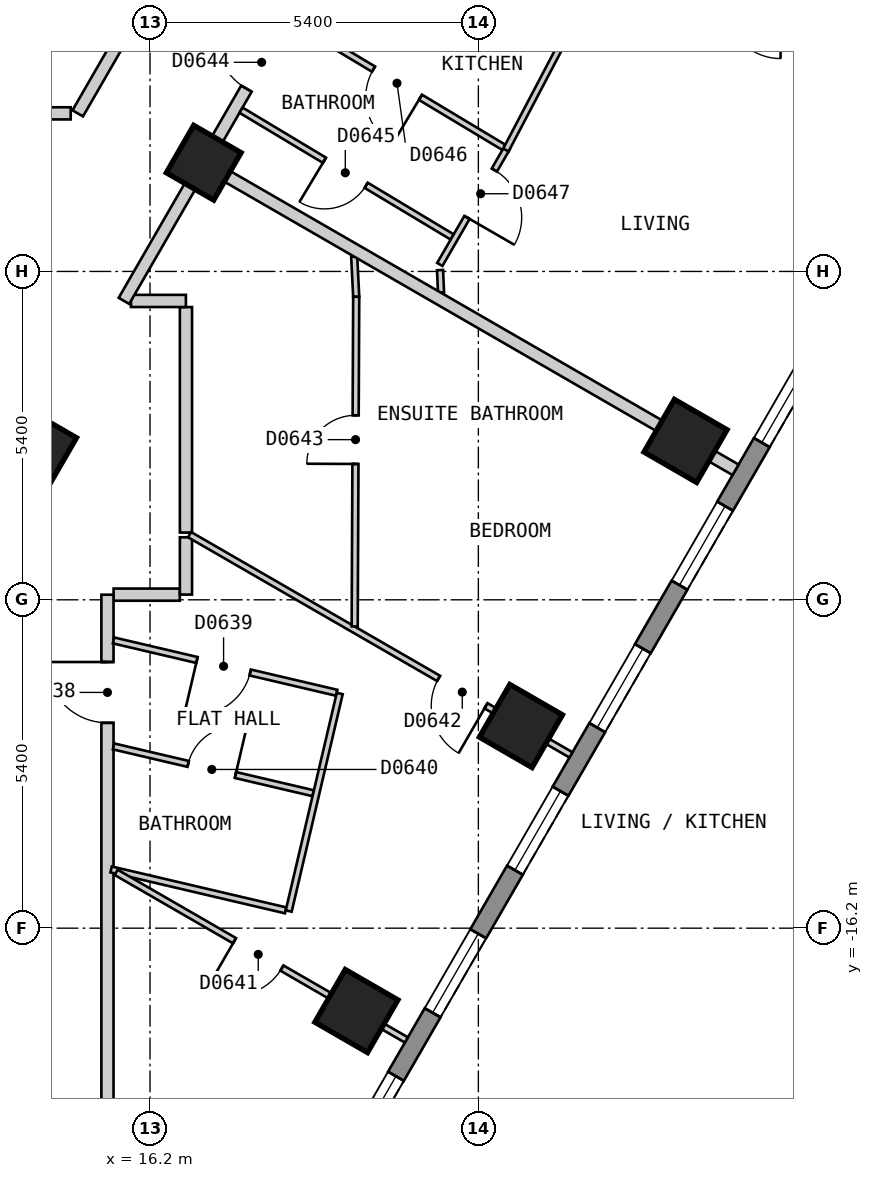
"""IFC4 building model, lengths in metres.
Left out: names, types, materials, properties, quantities, classifications, styles, units other than length and angle.
Written with IfcOpenShell. Run it as: python <this file> out.ifc"""

import sys

from ifc_helpers import new_model, si_unit, direction, frame, frame_2d, origin, origin_2d, place, context, subcontext, project, spatial, polyline, rectangle, outline, extrude, element, fill, save


model = new_model("IFC4")
c1 = context("Model", 3, precision=1e-05, world=origin(), true_north=direction((0.0, 1.0)))
c2 = subcontext(c1, "Body", "Model", "MODEL_VIEW")
j1 = project(units=[si_unit("LENGTHUNIT", "METRE"), si_unit("PLANEANGLEUNIT", "RADIAN")], contexts=[c1])
p1 = place(None, origin())
s1 = spatial("IfcSite", under=j1, at=p1, CompositionType="ELEMENT")
p2 = place(p1, origin())
s2 = spatial("IfcBuilding", under=s1, at=p2, CompositionType="ELEMENT")
p3 = place(p2, frame((0.0, 0.0, 81.0)))
s3 = spatial("IfcBuildingStorey", under=s2, at=p3, CompositionType="ELEMENT", Elevation=81.0)
for number, where, z_axis, x_axis in (
    (1, (19.594, -17.563, 0.0), (0.0, 0.0, 1.0), (0.5, 0.866, 0.0)),
    (2, (22.3, -12.875, 0.0), (0.0, 0.0, 1.0), (0.5, 0.866, 0.0)),
    (3, (25.007, -8.187, 0.0), (0.0, 0.0, 1.0), (0.5, 0.866, 0.0)),
):
    element("IfcColumn", number, at=place(p3, frame(where, z_axis=z_axis, x_axis=x_axis)), inside=s3, PredefinedType="COLUMN", context=c2, shape_type="SweptSolid", body=[
        extrude(rectangle(XDim=1.0, YDim=1.0, at=origin_2d()), origin(), (0.0, 0.0, 1.0), 3.0),
    ])
for number, where, z_axis, x_axis in (
    (4, (14.376, -8.3, 0.0), (0.0, 0.0, 1.0), (0.5, 0.866, 0.0)),
    (5, (17.083, -3.612, 0.0), (0.0, 0.0, 1.0), (0.5, 0.866, 0.0)),
):
    element("IfcColumn", number, at=place(p3, frame(where, z_axis=z_axis, x_axis=x_axis)), inside=s3, PredefinedType="COLUMN", context=c2, shape_type="SweptSolid", body=[
        extrude(rectangle(XDim=0.9, YDim=0.9, at=origin_2d()), origin(), (0.0, 0.0, 1.0), 3.0),
    ])
p4 = place(p3, frame((17.479, -23.425, 0.0), z_axis=(0.0, 0.0, 1.0), x_axis=(0.500035407905, 0.866004960056, 0.0)))
e6 = element("IfcWall", 6, at=p4, inside=s3, PredefinedType="SOLIDWALL", context=c2, shape_type="SweptSolid", body=[
    extrude(outline(polyline([(0.0, -0.15), (23.094, -0.15), (23.014, 0.15), (0.08, 0.15), (0.0, -0.15)])), origin(), (0.0, 0.0, 1.0), 2.7),
])
p5 = place(p4, frame((1.324, 0.0, 0.15)))
e7 = element("IfcOpeningElement", 7, at=p5, cuts=e6, PredefinedType="OPENING", context=c2, shape_type="SweptSolid", body=[
    extrude(rectangle(XDim=1.5, YDim=2.1, at=frame_2d((0.75, 1.05))), frame((0.0, 0.16, 0.0), z_axis=(0.0, -1.0, 0.0), x_axis=(1.0, 0.0, 0.0)), (0.0, 0.0, 1.0), 0.32),
])
p6 = place(p4, frame((4.031, 0.0, 0.15)))
e8 = element("IfcOpeningElement", 8, at=p6, cuts=e6, PredefinedType="OPENING", context=c2, shape_type="SweptSolid", body=[
    extrude(rectangle(XDim=1.5, YDim=2.1, at=frame_2d((0.75, 1.05))), frame((0.0, 0.16, 0.0), z_axis=(0.0, -1.0, 0.0), x_axis=(1.0, 0.0, 0.0)), (0.0, 0.0, 1.0), 0.32),
])
p7 = place(p4, frame((6.737, 0.0, 0.15)))
e9 = element("IfcOpeningElement", 9, at=p7, cuts=e6, PredefinedType="OPENING", context=c2, shape_type="SweptSolid", body=[
    extrude(rectangle(XDim=1.5, YDim=2.1, at=frame_2d((0.75, 1.05))), frame((0.0, 0.16, 0.0), z_axis=(0.0, -1.0, 0.0), x_axis=(1.0, 0.0, 0.0)), (0.0, 0.0, 1.0), 0.32),
])
p8 = place(p4, frame((9.444, 0.0, 0.15)))
e10 = element("IfcOpeningElement", 10, at=p8, cuts=e6, PredefinedType="OPENING", context=c2, shape_type="SweptSolid", body=[
    extrude(rectangle(XDim=1.5, YDim=2.1, at=frame_2d((0.75, 1.05))), frame((0.0, 0.16, 0.0), z_axis=(0.0, -1.0, 0.0), x_axis=(1.0, 0.0, 0.0)), (0.0, 0.0, 1.0), 0.32),
])
p9 = place(p4, frame((12.151, 0.0, 0.15)))
e11 = element("IfcOpeningElement", 11, at=p9, cuts=e6, PredefinedType="OPENING", context=c2, shape_type="SweptSolid", body=[
    extrude(rectangle(XDim=1.5, YDim=2.1, at=frame_2d((0.75, 1.05))), frame((0.0, 0.16, 0.0), z_axis=(0.0, -1.0, 0.0), x_axis=(1.0, 0.0, 0.0)), (0.0, 0.0, 1.0), 0.32),
])
p10 = place(p4, frame((14.857, 0.0, 0.15)))
e12 = element("IfcOpeningElement", 12, at=p10, cuts=e6, PredefinedType="OPENING", context=c2, shape_type="SweptSolid", body=[
    extrude(rectangle(XDim=1.5, YDim=2.1, at=frame_2d((0.75, 1.05))), frame((0.0, 0.16, 0.0), z_axis=(0.0, -1.0, 0.0), x_axis=(1.0, 0.0, 0.0)), (0.0, 0.0, 1.0), 0.32),
])
p11 = place(p4, frame((17.564, 0.0, 0.15)))
e13 = element("IfcOpeningElement", 13, at=p11, cuts=e6, PredefinedType="OPENING", context=c2, shape_type="SweptSolid", body=[
    extrude(rectangle(XDim=1.5, YDim=2.1, at=frame_2d((0.75, 1.05))), frame((0.0, 0.16, 0.0), z_axis=(0.0, -1.0, 0.0), x_axis=(1.0, 0.0, 0.0)), (0.0, 0.0, 1.0), 0.32),
])
p12 = place(p4, frame((20.271, 0.0, 0.15)))
e14 = element("IfcOpeningElement", 14, at=p12, cuts=e6, PredefinedType="OPENING", context=c2, shape_type="SweptSolid", body=[
    extrude(rectangle(XDim=1.5, YDim=2.1, at=frame_2d((0.75, 1.05))), frame((0.0, 0.16, 0.0), z_axis=(0.0, -1.0, 0.0), x_axis=(1.0, 0.0, 0.0)), (0.0, 0.0, 1.0), 0.32),
])
p13 = place(p3, frame((16.791, -5.986, 0.0), z_axis=(0.0, 0.0, 1.0), x_axis=(0.0, -1.0, 0.0)))
e15 = element("IfcWall", 15, at=p13, inside=s3, PredefinedType="PARTITIONING", context=c2, shape_type="SweptSolid", body=[
    extrude(rectangle(XDim=3.708, YDim=0.2, at=frame_2d((1.854, 0.0))), origin(), (0.0, 0.0, 1.0), 2.7),
])
p14 = place(p3, frame((15.887, -5.885, 0.0), z_axis=(0.0, 0.0, 1.0), x_axis=(1.0, 0.0, 0.0)))
e16 = element("IfcWall", 16, at=p14, inside=s3, PredefinedType="PARTITIONING", context=c2, shape_type="SweptSolid", body=[
    extrude(rectangle(XDim=0.903, YDim=0.2, at=frame_2d((0.452, 0.0))), origin(), (0.0, 0.0, 1.0), 2.7),
])
p15 = place(p3, frame((15.601, -10.715, 0.0), z_axis=(0.0, 0.0, 1.0), x_axis=(1.0, 0.0, 0.0)))
e17 = element("IfcWall", 17, at=p15, inside=s3, PredefinedType="PARTITIONING", context=c2, shape_type="SweptSolid", body=[
    extrude(rectangle(XDim=1.089, YDim=0.2, at=frame_2d((0.544, 0.0))), origin(), (0.0, 0.0, 1.0), 2.7),
])
p16 = place(p3, frame((6.929, -2.8, 0.0), z_axis=(0.0, 0.0, 1.0), x_axis=(1.0, 0.0, 0.0)))
e18 = element("IfcWall", 18, at=p16, inside=s3, PredefinedType="PARTITIONING", context=c2, shape_type="SweptSolid", body=[
    extrude(rectangle(XDim=7.966, YDim=0.2, at=frame_2d((3.983, 0.0))), origin(), (0.0, 0.0, 1.0), 2.7),
])
p17 = place(p3, frame((15.011, -2.8, 0.0), z_axis=(0.0, 0.0, 1.0), x_axis=(0.499929208183, 0.866066271601, 0.0)))
e19 = element("IfcWall", 19, at=p17, inside=s3, PredefinedType="PARTITIONING", context=c2, shape_type="SweptSolid", body=[
    extrude(rectangle(XDim=2.078, YDim=0.2, at=frame_2d((1.039, 0.0))), origin(), (0.0, 0.0, 1.0), 2.7),
])
p18 = place(p3, frame((15.771, -5.884, 0.0), z_axis=(0.0, 0.0, 1.0), x_axis=(0.499939494019, 0.866060334111, 0.0)))
e20 = element("IfcWall", 20, at=p18, inside=s3, PredefinedType="PARTITIONING", context=c2, shape_type="SweptSolid", body=[
    extrude(rectangle(XDim=5.583, YDim=0.2, at=frame_2d((2.792, 0.0))), origin(), (0.0, 0.0, 1.0), 2.7),
])
p19 = place(p18, frame((4.03, 0.0, 0.0)))
e21 = element("IfcOpeningElement", 21, at=p19, cuts=e20, PredefinedType="OPENING", context=c2, shape_type="SweptSolid", body=[
    extrude(rectangle(XDim=1.0, YDim=2.1, at=frame_2d((0.5, 1.05))), frame((0.0, 0.11, 0.0), z_axis=(0.0, -1.0, 0.0), x_axis=(1.0, 0.0, 0.0)), (0.0, 0.0, 1.0), 0.22),
])
p20 = place(p3, frame((15.5, -21.199, 0.0), z_axis=(0.0, 0.0, 1.0), x_axis=(0.0, 1.0, 0.0)))
e22 = element("IfcWall", 22, at=p20, inside=s3, PredefinedType="PARTITIONING", context=c2, shape_type="SweptSolid", body=[
    extrude(rectangle(XDim=10.483, YDim=0.2, at=frame_2d((5.241, 0.0))), origin(), (0.0, 0.0, 1.0), 2.7),
])
p21 = place(p20, frame((8.376, 0.0, 0.0)))
e23 = element("IfcOpeningElement", 23, at=p21, cuts=e22, PredefinedType="OPENING", context=c2, shape_type="SweptSolid", body=[
    extrude(rectangle(XDim=1.0, YDim=2.1, at=frame_2d((0.5, 1.05))), frame((0.0, 0.11, 0.0), z_axis=(0.0, -1.0, 0.0), x_axis=(1.0, 0.0, 0.0)), (0.0, 0.0, 1.0), 0.22),
])
p22 = place(p3, frame((16.791, -10.714, 0.0), z_axis=(0.0, 0.0, 1.0), x_axis=(0.0, 1.0, 0.0)))
e24 = element("IfcWall", 24, at=p22, inside=s3, PredefinedType="PARTITIONING", context=c2, shape_type="SweptSolid", body=[
    extrude(rectangle(XDim=0.942, YDim=0.2, at=frame_2d((0.471, 0.0))), origin(), (0.0, 0.0, 1.0), 2.7),
])
p23 = place(p3, frame((19.558, -5.156, 0.0), z_axis=(0.0, 0.0, 1.0), x_axis=(0.04980880462, -0.998758771167, 0.0)))
e25 = element("IfcWall", 25, at=p23, inside=s3, PredefinedType="PARTITIONING", context=c2, shape_type="SweptSolid", body=[
    extrude(rectangle(XDim=0.662, YDim=0.1, at=frame_2d((0.331, 0.0))), origin(), (0.0, 0.0, 1.0), 2.7),
])
p24 = place(p3, frame((20.97, -5.378, 0.0), z_axis=(0.0, 0.0, 1.0), x_axis=(0.043266532348, -0.999063565134, 0.0)))
e26 = element("IfcWall", 26, at=p24, inside=s3, PredefinedType="PARTITIONING", context=c2, shape_type="SweptSolid", body=[
    extrude(rectangle(XDim=0.372, YDim=0.1, at=frame_2d((0.186, 0.0))), origin(), (0.0, 0.0, 1.0), 2.7),
])
p25 = place(p3, frame((15.6, -11.468, 0.0), z_axis=(0.0, 0.0, 1.0), x_axis=(0.973560523801, -0.228429215503, 0.0)))
e27 = element("IfcWall", 27, at=p25, inside=s3, PredefinedType="PARTITIONING", context=c2, shape_type="SweptSolid", body=[
    extrude(rectangle(XDim=3.77, YDim=0.1, at=frame_2d((1.885, 0.0))), origin(), (0.0, 0.0, 1.0), 2.7),
])
p26 = place(p25, frame((1.409, 0.0, 0.0)))
e28 = element("IfcOpeningElement", 28, at=p26, cuts=e27, PredefinedType="OPENING", context=c2, shape_type="SweptSolid", body=[
    extrude(rectangle(XDim=0.9, YDim=2.1, at=frame_2d((0.45, 1.05))), frame((0.0, 0.06, 0.0), z_axis=(0.0, -1.0, 0.0), x_axis=(1.0, 0.0, 0.0)), (0.0, 0.0, 1.0), 0.12),
])
p27 = place(p3, frame((15.6, -13.211, 0.0), z_axis=(0.0, 0.0, 1.0), x_axis=(0.973593440667, -0.228288879032, 0.0)))
e29 = element("IfcWall", 29, at=p27, inside=s3, PredefinedType="PARTITIONING", context=c2, shape_type="SweptSolid", body=[
    extrude(rectangle(XDim=3.373, YDim=0.1, at=frame_2d((1.687, 0.0))), origin(), (0.0, 0.0, 1.0), 2.7),
])
p28 = place(p27, frame((1.26, 0.0, 0.0)))
e30 = element("IfcOpeningElement", 30, at=p28, cuts=e29, PredefinedType="OPENING", context=c2, shape_type="SweptSolid", body=[
    extrude(rectangle(XDim=0.8, YDim=2.1, at=frame_2d((0.4, 1.05))), frame((0.0, 0.06, 0.0), z_axis=(0.0, -1.0, 0.0), x_axis=(1.0, 0.0, 0.0)), (0.0, 0.0, 1.0), 0.12),
])
p29 = place(p3, frame((15.56, -15.234, 0.0), z_axis=(0.0, 0.0, 1.0), x_axis=(0.973598200068, -0.228268580457, 0.0)))
e31 = element("IfcWall", 31, at=p29, inside=s3, PredefinedType="PARTITIONING", context=c2, shape_type="SweptSolid", body=[
    extrude(rectangle(XDim=2.949, YDim=0.1, at=frame_2d((1.474, 0.0))), origin(), (0.0, 0.0, 1.0), 2.7),
])
p30 = place(p3, frame((15.643, -15.282, 0.0), z_axis=(0.0, 0.0, 1.0), x_axis=(0.865990833325, -0.500059873013, 0.0)))
e32 = element("IfcWall", 32, at=p30, inside=s3, PredefinedType="PARTITIONING", context=c2, shape_type="SweptSolid", body=[
    extrude(rectangle(XDim=5.511, YDim=0.1, at=frame_2d((2.756, 0.0))), origin(), (0.0, 0.0, 1.0), 2.7),
])
p31 = place(p30, frame((2.248, 0.0, 0.0)))
e33 = element("IfcOpeningElement", 33, at=p31, cuts=e32, PredefinedType="OPENING", context=c2, shape_type="SweptSolid", body=[
    extrude(rectangle(XDim=0.9, YDim=2.1, at=frame_2d((0.45, 1.05))), frame((0.0, 0.06, 0.0), z_axis=(0.0, -1.0, 0.0), x_axis=(1.0, 0.0, 0.0)), (0.0, 0.0, 1.0), 0.12),
])
p32 = place(p3, frame((16.851, -9.729, 0.0), z_axis=(0.0, 0.0, 1.0), x_axis=(0.866027278279, -0.499996753267, 0.0)))
e34 = element("IfcWall", 34, at=p32, inside=s3, PredefinedType="PARTITIONING", context=c2, shape_type="SweptSolid", body=[
    extrude(rectangle(XDim=7.242, YDim=0.1, at=frame_2d((3.621, 0.0))), origin(), (0.0, 0.0, 1.0), 2.7),
])
p33 = place(p32, frame((4.728, 0.0, 0.0)))
e35 = element("IfcOpeningElement", 35, at=p33, cuts=e34, PredefinedType="OPENING", context=c2, shape_type="SweptSolid", body=[
    extrude(rectangle(XDim=0.9, YDim=2.1, at=frame_2d((0.45, 1.05))), frame((0.0, 0.06, 0.0), z_axis=(0.0, -1.0, 0.0), x_axis=(1.0, 0.0, 0.0)), (0.0, 0.0, 1.0), 0.12),
])
p34 = place(p3, frame((17.697, -2.748, 0.0), z_axis=(0.0, 0.0, 1.0), x_axis=(0.857359945576, -0.514717324093, 0.0)))
e36 = element("IfcWall", 36, at=p34, inside=s3, PredefinedType="PARTITIONING", context=c2, shape_type="SweptSolid", body=[
    extrude(rectangle(XDim=4.051, YDim=0.1, at=frame_2d((2.025, 0.0))), origin(), (0.0, 0.0, 1.0), 2.7),
])
p35 = place(p34, frame((1.6, 0.0, 0.0)))
e37 = element("IfcOpeningElement", 37, at=p35, cuts=e36, PredefinedType="OPENING", context=c2, shape_type="SweptSolid", body=[
    extrude(rectangle(XDim=0.8, YDim=2.1, at=frame_2d((0.4, 1.05))), frame((0.0, 0.06, 0.0), z_axis=(0.0, -1.0, 0.0), x_axis=(1.0, 0.0, 0.0)), (0.0, 0.0, 1.0), 0.12),
])
p36 = place(p3, frame((18.547, -1.275, 0.0), z_axis=(0.0, 0.0, 1.0), x_axis=(0.85733334763, -0.514761625456, 0.0)))
e38 = element("IfcWall", 38, at=p36, inside=s3, PredefinedType="PARTITIONING", context=c2, shape_type="SweptSolid", body=[
    extrude(rectangle(XDim=4.051, YDim=0.1, at=frame_2d((2.025, 0.0))), origin(), (0.0, 0.0, 1.0), 2.7),
])
p37 = place(p36, frame((1.55, 0.0, 0.0)))
e39 = element("IfcOpeningElement", 39, at=p37, cuts=e38, PredefinedType="OPENING", context=c2, shape_type="SweptSolid", body=[
    extrude(rectangle(XDim=0.9, YDim=2.1, at=frame_2d((0.45, 1.05))), frame((0.0, 0.06, 0.0), z_axis=(0.0, -1.0, 0.0), x_axis=(1.0, 0.0, 0.0)), (0.0, 0.0, 1.0), 0.12),
])
p38 = place(p3, frame((20.966, -5.285, 0.0), z_axis=(0.0, 0.0, 1.0), x_axis=(0.500244510215, 0.865884189716, 0.0)))
e40 = element("IfcWall", 40, at=p38, inside=s3, PredefinedType="PARTITIONING", context=c2, shape_type="SweptSolid", body=[
    extrude(rectangle(XDim=2.213, YDim=0.1, at=frame_2d((1.106, 0.0))), origin(), (0.0, 0.0, 1.0), 2.7),
])
p39 = place(p38, frame((0.893, 0.0, 0.0)))
e41 = element("IfcOpeningElement", 41, at=p39, cuts=e40, PredefinedType="OPENING", context=c2, shape_type="SweptSolid", body=[
    extrude(rectangle(XDim=0.9, YDim=2.1, at=frame_2d((0.45, 1.05))), frame((0.0, 0.06, 0.0), z_axis=(0.0, -1.0, 0.0), x_axis=(1.0, 0.0, 0.0)), (0.0, 0.0, 1.0), 0.12),
])
p40 = place(p3, frame((22.053, -3.403, 0.0), z_axis=(0.0, 0.0, 1.0), x_axis=(0.465190117005, 0.885210796952, 0.0)))
e42 = element("IfcWall", 42, at=p40, inside=s3, PredefinedType="PARTITIONING", context=c2, shape_type="SweptSolid", body=[
    extrude(rectangle(XDim=2.659, YDim=0.1, at=frame_2d((1.33, 0.0))), origin(), (0.0, 0.0, 1.0), 2.7),
])
p41 = place(p3, frame((18.481, -15.918, 0.0), z_axis=(0.0, 0.0, 1.0), x_axis=(0.228391116115, 0.97356946238, 0.0)))
e43 = element("IfcWall", 43, at=p41, inside=s3, PredefinedType="PARTITIONING", context=c2, shape_type="SweptSolid", body=[
    extrude(rectangle(XDim=3.674, YDim=0.1, at=frame_2d((1.837, 0.0))), origin(), (0.0, 0.0, 1.0), 2.7),
])
p42 = place(p3, frame((19.566, -11.238, 0.0), z_axis=(0.0, 0.0, 1.0), x_axis=(0.004638545009, 0.999989241892, 0.0)))
e44 = element("IfcWall", 44, at=p42, inside=s3, PredefinedType="PARTITIONING", context=c2, shape_type="SweptSolid", body=[
    extrude(rectangle(XDim=5.421, YDim=0.1, at=frame_2d((2.71, 0.0))), origin(), (0.0, 0.0, 1.0), 2.7),
])
p43 = place(p42, frame((2.672, 0.0, 0.0)))
e45 = element("IfcOpeningElement", 45, at=p43, cuts=e44, PredefinedType="OPENING", context=c2, shape_type="SweptSolid", body=[
    extrude(rectangle(XDim=0.8, YDim=2.1, at=frame_2d((0.4, 1.05))), frame((0.0, 0.06, 0.0), z_axis=(0.0, -1.0, 0.0), x_axis=(1.0, 0.0, 0.0)), (0.0, 0.0, 1.0), 0.12),
])
p44 = place(p3, frame((17.169, -3.662, 0.0), z_axis=(0.0, 0.0, 1.0), x_axis=(0.866047370643, -0.499961950354, 0.0)))
e46 = element("IfcWall", 46, at=p44, inside=s3, PredefinedType="PARTITIONING", context=c2, shape_type="SweptSolid", body=[
    extrude(rectangle(XDim=10.001, YDim=0.2, at=frame_2d((5.0, 0.0))), origin(), (0.0, 0.0, 1.0), 2.7),
])
p45 = place(p6, origin())
e47 = element("IfcWindow", 47, at=p45, inside=s3, PartitioningType="SINGLE_PANEL", PredefinedType="WINDOW", context=c2, shape_type="SweptSolid", body=[
    extrude(rectangle(XDim=1.5, YDim=2.1, at=frame_2d((0.75, 1.05))), frame((0.0, 0.03, 0.0), z_axis=(0.0, -1.0, 0.0), x_axis=(1.0, 0.0, 0.0)), (0.0, 0.0, 1.0), 0.06),
])
fill(e8, e47)
p46 = place(p7, origin())
e48 = element("IfcWindow", 48, at=p46, inside=s3, PartitioningType="SINGLE_PANEL", PredefinedType="WINDOW", context=c2, shape_type="SweptSolid", body=[
    extrude(rectangle(XDim=1.5, YDim=2.1, at=frame_2d((0.75, 1.05))), frame((0.0, 0.03, 0.0), z_axis=(0.0, -1.0, 0.0), x_axis=(1.0, 0.0, 0.0)), (0.0, 0.0, 1.0), 0.06),
])
fill(e9, e48)
p47 = place(p8, origin())
e49 = element("IfcWindow", 49, at=p47, inside=s3, PartitioningType="SINGLE_PANEL", PredefinedType="WINDOW", context=c2, shape_type="SweptSolid", body=[
    extrude(rectangle(XDim=1.5, YDim=2.1, at=frame_2d((0.75, 1.05))), frame((0.0, 0.03, 0.0), z_axis=(0.0, -1.0, 0.0), x_axis=(1.0, 0.0, 0.0)), (0.0, 0.0, 1.0), 0.06),
])
fill(e10, e49)
p48 = place(p9, origin())
e50 = element("IfcWindow", 50, at=p48, inside=s3, PartitioningType="SINGLE_PANEL", PredefinedType="WINDOW", context=c2, shape_type="SweptSolid", body=[
    extrude(rectangle(XDim=1.5, YDim=2.1, at=frame_2d((0.75, 1.05))), frame((0.0, 0.03, 0.0), z_axis=(0.0, -1.0, 0.0), x_axis=(1.0, 0.0, 0.0)), (0.0, 0.0, 1.0), 0.06),
])
fill(e11, e50)
p49 = place(p10, origin())
e51 = element("IfcWindow", 51, at=p49, inside=s3, PartitioningType="SINGLE_PANEL", PredefinedType="WINDOW", context=c2, shape_type="SweptSolid", body=[
    extrude(rectangle(XDim=1.5, YDim=2.1, at=frame_2d((0.75, 1.05))), frame((0.0, 0.03, 0.0), z_axis=(0.0, -1.0, 0.0), x_axis=(1.0, 0.0, 0.0)), (0.0, 0.0, 1.0), 0.06),
])
fill(e12, e51)
p50 = place(p11, origin())
e52 = element("IfcWindow", 52, at=p50, inside=s3, PartitioningType="SINGLE_PANEL", PredefinedType="WINDOW", context=c2, shape_type="SweptSolid", body=[
    extrude(rectangle(XDim=1.5, YDim=2.1, at=frame_2d((0.75, 1.05))), frame((0.0, 0.03, 0.0), z_axis=(0.0, -1.0, 0.0), x_axis=(1.0, 0.0, 0.0)), (0.0, 0.0, 1.0), 0.06),
])
fill(e13, e52)
p51 = place(p21, origin())
e53 = element("IfcDoor", 53, at=p51, inside=s3, OperationType="SINGLE_SWING_RIGHT", PredefinedType="DOOR", context=c2, shape_type="SweptSolid", body=[
    extrude(rectangle(XDim=1.0, YDim=2.1, at=frame_2d((0.5, 1.05))), frame((0.0, 0.025, 0.0), z_axis=(0.0, -1.0, 0.0), x_axis=(1.0, 0.0, 0.0)), (0.0, 0.0, 1.0), 0.05),
])
fill(e23, e53)
p52 = place(p26, origin())
e54 = element("IfcDoor", 54, at=p52, inside=s3, OperationType="SINGLE_SWING_LEFT", PredefinedType="DOOR", context=c2, shape_type="SweptSolid", body=[
    extrude(rectangle(XDim=0.9, YDim=2.1, at=frame_2d((0.45, 1.05))), frame((0.0, 0.025, 0.0), z_axis=(0.0, -1.0, 0.0), x_axis=(1.0, 0.0, 0.0)), (0.0, 0.0, 1.0), 0.05),
])
fill(e28, e54)
p53 = place(p28, origin())
e55 = element("IfcDoor", 55, at=p53, inside=s3, OperationType="SINGLE_SWING_RIGHT", PredefinedType="DOOR", context=c2, shape_type="SweptSolid", body=[
    extrude(rectangle(XDim=0.8, YDim=2.1, at=frame_2d((0.4, 1.05))), frame((0.0, 0.025, 0.0), z_axis=(0.0, -1.0, 0.0), x_axis=(1.0, 0.0, 0.0)), (0.0, 0.0, 1.0), 0.05),
])
fill(e30, e55)
p54 = place(p31, origin())
e56 = element("IfcDoor", 56, at=p54, inside=s3, OperationType="SINGLE_SWING_LEFT", PredefinedType="DOOR", context=c2, shape_type="SweptSolid", body=[
    extrude(rectangle(XDim=0.9, YDim=2.1, at=frame_2d((0.45, 1.05))), frame((0.0, 0.025, 0.0), z_axis=(0.0, -1.0, 0.0), x_axis=(1.0, 0.0, 0.0)), (0.0, 0.0, 1.0), 0.05),
])
fill(e33, e56)
p55 = place(p33, origin())
e57 = element("IfcDoor", 57, at=p55, inside=s3, OperationType="SINGLE_SWING_RIGHT", PredefinedType="DOOR", context=c2, shape_type="SweptSolid", body=[
    extrude(rectangle(XDim=0.9, YDim=2.1, at=frame_2d((0.45, 1.05))), frame((0.0, 0.025, 0.0), z_axis=(0.0, -1.0, 0.0), x_axis=(1.0, 0.0, 0.0)), (0.0, 0.0, 1.0), 0.05),
])
fill(e35, e57)
p56 = place(p43, origin())
e58 = element("IfcDoor", 58, at=p56, inside=s3, OperationType="SINGLE_SWING_LEFT", PredefinedType="DOOR", context=c2, shape_type="SweptSolid", body=[
    extrude(rectangle(XDim=0.8, YDim=2.1, at=frame_2d((0.4, 1.05))), frame((0.0, 0.025, 0.0), z_axis=(0.0, -1.0, 0.0), x_axis=(1.0, 0.0, 0.0)), (0.0, 0.0, 1.0), 0.05),
])
fill(e45, e58)
p57 = place(p19, origin())
e59 = element("IfcDoor", 59, at=p57, inside=s3, OperationType="SINGLE_SWING_RIGHT", PredefinedType="DOOR", context=c2, shape_type="SweptSolid", body=[
    extrude(rectangle(XDim=1.0, YDim=2.1, at=frame_2d((0.5, 1.05))), frame((0.0, 0.025, 0.0), z_axis=(0.0, -1.0, 0.0), x_axis=(1.0, 0.0, 0.0)), (0.0, 0.0, 1.0), 0.05),
])
fill(e21, e59)
p58 = place(p35, origin())
e60 = element("IfcDoor", 60, at=p58, inside=s3, OperationType="SINGLE_SWING_LEFT", PredefinedType="DOOR", context=c2, shape_type="SweptSolid", body=[
    extrude(rectangle(XDim=0.8, YDim=2.1, at=frame_2d((0.4, 1.05))), frame((0.0, 0.025, 0.0), z_axis=(0.0, -1.0, 0.0), x_axis=(1.0, 0.0, 0.0)), (0.0, 0.0, 1.0), 0.05),
])
fill(e37, e60)
p59 = place(p37, origin())
e61 = element("IfcDoor", 61, at=p59, inside=s3, OperationType="SINGLE_SWING_RIGHT", PredefinedType="DOOR", context=c2, shape_type="SweptSolid", body=[
    extrude(rectangle(XDim=0.9, YDim=2.1, at=frame_2d((0.45, 1.05))), frame((0.0, 0.025, 0.0), z_axis=(0.0, -1.0, 0.0), x_axis=(1.0, 0.0, 0.0)), (0.0, 0.0, 1.0), 0.05),
])
fill(e39, e61)
p60 = place(p39, origin())
e62 = element("IfcDoor", 62, at=p60, inside=s3, OperationType="SINGLE_SWING_LEFT", PredefinedType="DOOR", context=c2, shape_type="SweptSolid", body=[
    extrude(rectangle(XDim=0.9, YDim=2.1, at=frame_2d((0.45, 1.05))), frame((0.0, 0.025, 0.0), z_axis=(0.0, -1.0, 0.0), x_axis=(1.0, 0.0, 0.0)), (0.0, 0.0, 1.0), 0.05),
])
fill(e41, e62)
save(model, sys.argv[1])
